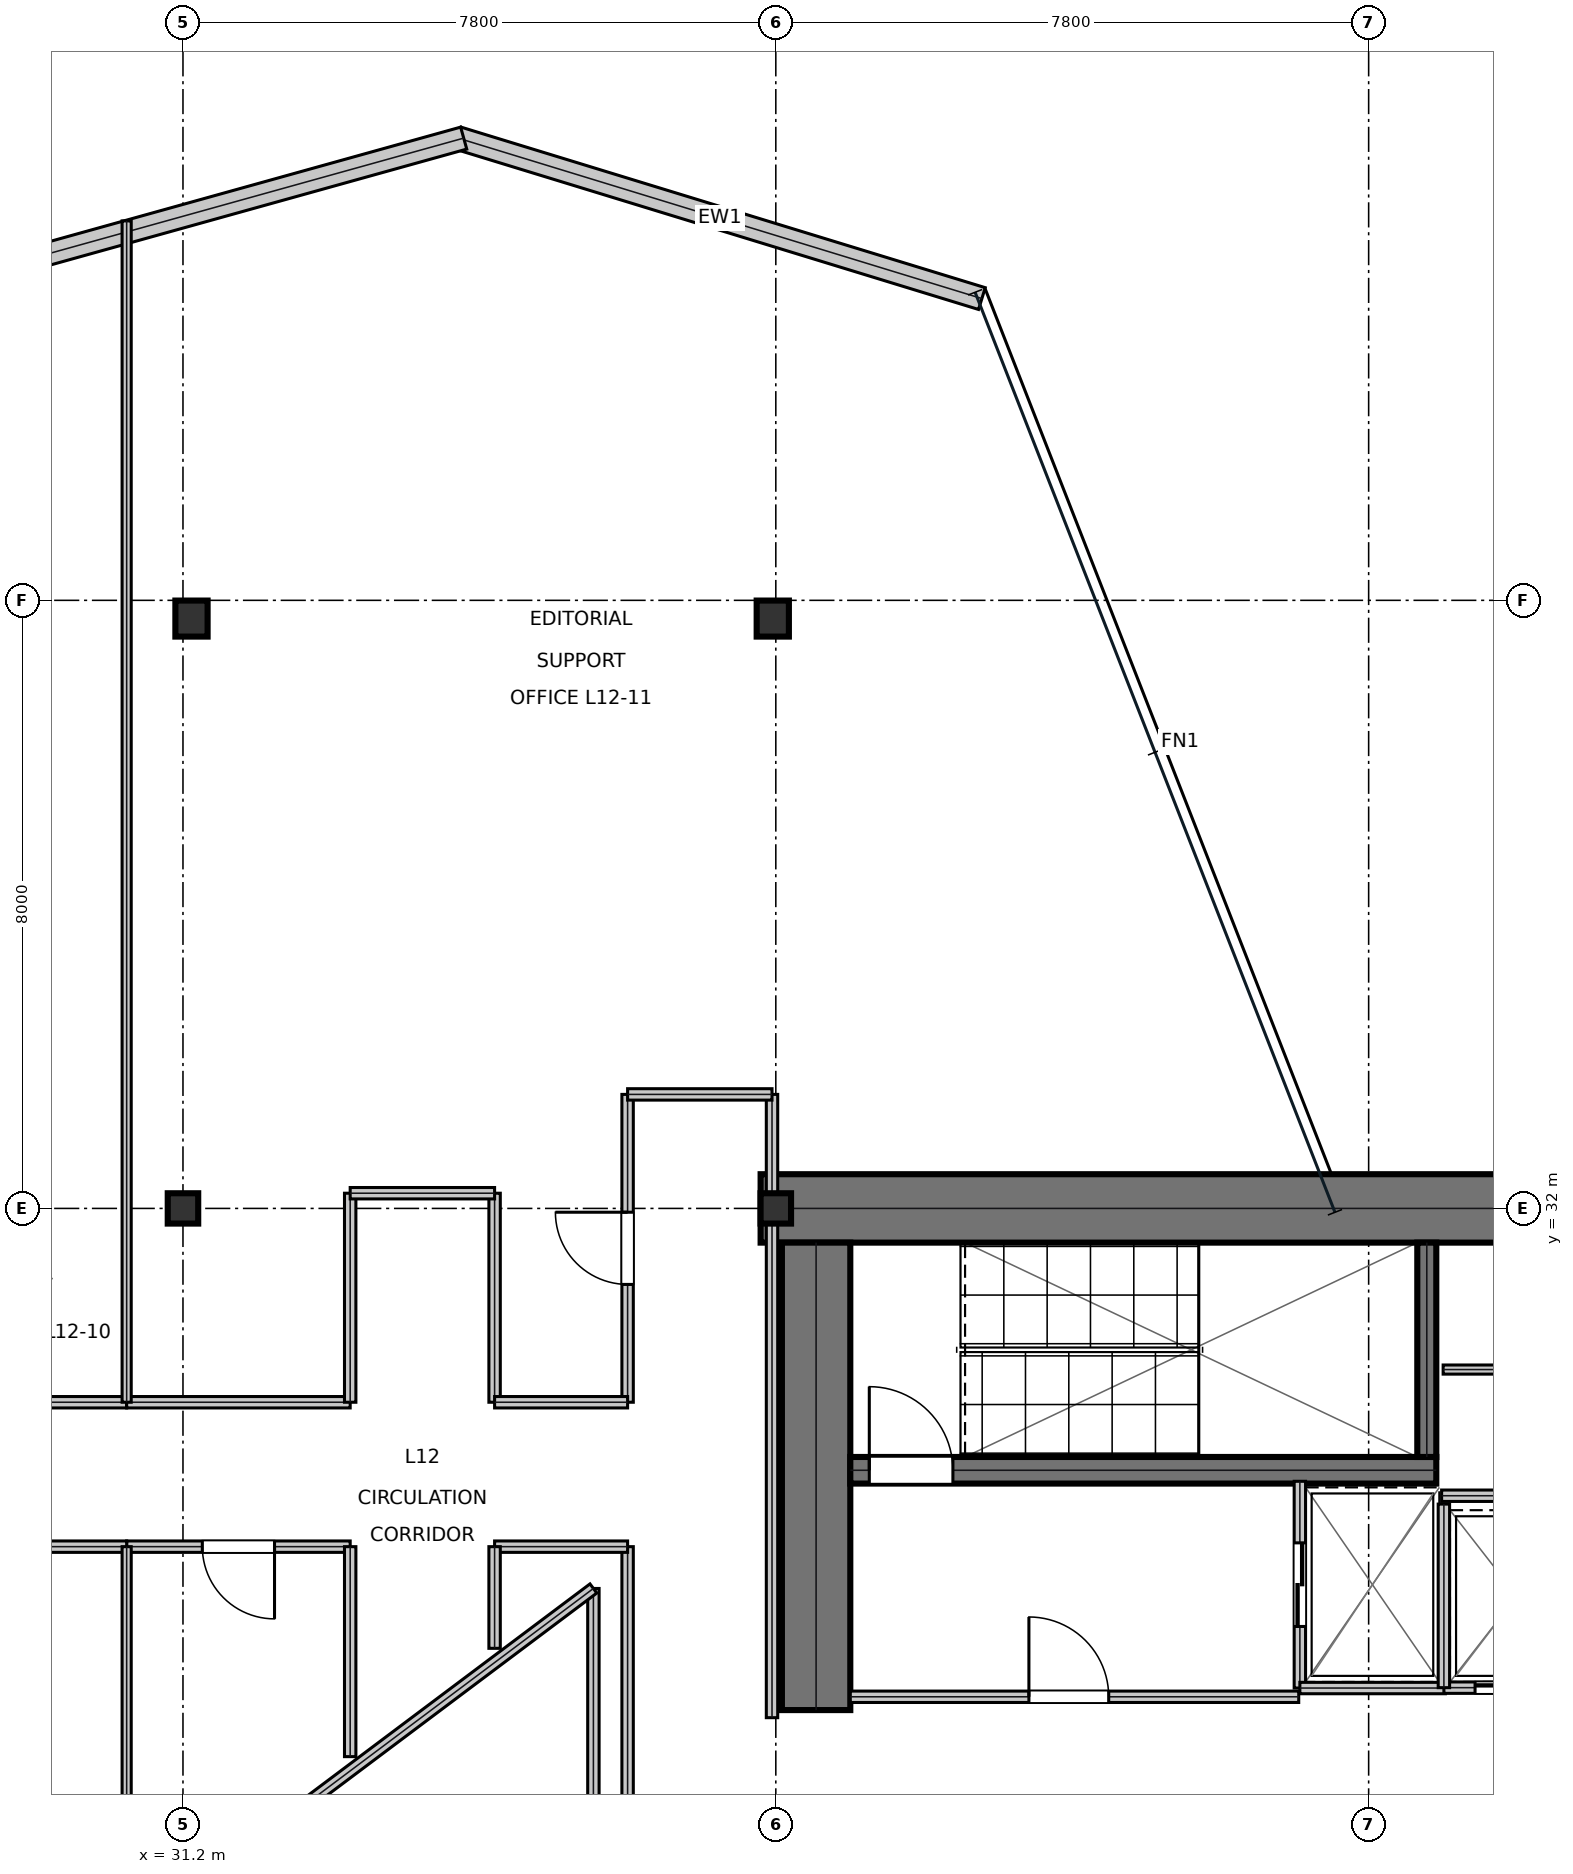
"""IFC4 building model, lengths in metres.
Left out: names, types, materials, properties, quantities, classifications, styles, units other than length and angle.
Written with IfcOpenShell. Run it as: python <this file> out.ifc"""

import sys

from ifc_helpers import new_model, si_unit, direction, frame, frame_2d, origin, origin_2d, place, context, subcontext, project, spatial, rectangle, i_section, extrude, element, fill, save


model = new_model("IFC4")
c1 = context("Model", 3, precision=1e-05, world=origin(), true_north=direction((0.0, 1.0)))
c2 = subcontext(c1, "Body", "Model", "MODEL_VIEW")
j1 = project(units=[si_unit("LENGTHUNIT", "METRE"), si_unit("PLANEANGLEUNIT", "RADIAN")], contexts=[c1])
p1 = place(None, origin())
s1 = spatial("IfcSite", under=j1, at=p1, CompositionType="ELEMENT")
p2 = place(p1, origin())
s2 = spatial("IfcBuilding", under=s1, at=p2, CompositionType="ELEMENT")
p3 = place(p2, frame((0.0, 0.0, 58.05)))
s3 = spatial("IfcBuildingStorey", under=s2, at=p3, CompositionType="ELEMENT", Elevation=58.05)
p4 = place(p3, frame((38.8, 32.0, 0.0), z_axis=(0.0, 0.0, 1.0), x_axis=(1.0, 0.0, 0.0)))
e1 = element("IfcWall", 1, at=p4, inside=s3, PredefinedType="SHEAR", context=c2, shape_type="SweptSolid", body=[
    extrude(rectangle(XDim=16.0, YDim=0.9, at=frame_2d((8.0, 0.0))), origin(), (0.0, 0.0, 1.0), 3.81),
])
p5 = place(p3, frame((39.53, 25.4, 0.0), z_axis=(0.0, 0.0, 1.0), x_axis=(0.0, 1.0, 0.0)))
e2 = element("IfcWall", 2, at=p5, inside=s3, PredefinedType="SHEAR", context=c2, shape_type="SweptSolid", body=[
    extrude(rectangle(XDim=6.15, YDim=0.9, at=frame_2d((3.075, 0.0))), origin(), (0.0, 0.0, 1.0), 3.81),
])
p6 = place(p3, frame((39.98, 28.555, 0.0), z_axis=(0.0, 0.0, 1.0), x_axis=(1.0, 0.0, 0.0)))
e3 = element("IfcWall", 3, at=p6, inside=s3, PredefinedType="SHEAR", context=c2, shape_type="SweptSolid", body=[
    extrude(rectangle(XDim=7.71, YDim=0.35, at=frame_2d((3.855, 0.0))), origin(), (0.0, 0.0, 1.0), 3.81),
])
p7 = place(p6, frame((0.25, 0.0, 0.0)))
e4 = element("IfcOpeningElement", 4, at=p7, cuts=e3, PredefinedType="OPENING", context=c2, shape_type="SweptSolid", body=[
    extrude(rectangle(XDim=1.1, YDim=2.15, at=frame_2d((0.55, 1.075))), frame((0.0, 0.185, 0.0), z_axis=(0.0, -1.0, 0.0), x_axis=(1.0, 0.0, 0.0)), (0.0, 0.0, 1.0), 0.37),
])
p8 = place(p3, frame((47.565, 28.73, 0.0), z_axis=(0.0, 0.0, 1.0), x_axis=(0.0, 1.0, 0.0)))
e5 = element("IfcWall", 5, at=p8, inside=s3, PredefinedType="SHEAR", context=c2, shape_type="SweptSolid", body=[
    extrude(rectangle(XDim=2.82, YDim=0.25, at=frame_2d((1.41, 0.0))), origin(), (0.0, 0.0, 1.0), 3.81),
])
for number, where, z_axis, x_axis in (
    (6, (31.2, 32.0, 0.0), (0.0, 0.0, 1.0), (1.0, 0.0, 0.0)),
    (7, (39.0, 32.0, 0.0), (0.0, 0.0, 1.0), (1.0, 0.0, 0.0)),
):
    element("IfcColumn", number, at=place(p3, frame(where, z_axis=z_axis, x_axis=x_axis)), inside=s3, PredefinedType="COLUMN", context=c2, shape_type="SweptSolid", body=[
        extrude(i_section(OverallWidth=0.401, OverallDepth=0.399, WebThickness=0.025, FlangeThickness=0.04, at=origin_2d()), origin(), (0.0, 0.0, 1.0), 4.044),
    ])
p9 = place(p3, frame((31.312, 39.76, 0.016), z_axis=(0.017423559696, -0.03727549008, 0.999153120101), x_axis=(0.905919107853, 0.423450788199, 0.0)))
e8 = element("IfcColumn", 8, at=p9, inside=s3, PredefinedType="COLUMN", context=c2, shape_type="SweptSolid", body=[
    extrude(i_section(OverallWidth=0.424, OverallDepth=0.474, WebThickness=0.048, FlangeThickness=0.077, at=origin_2d()), origin(), (0.0, 0.0, 1.0), 4.021),
])
p10 = place(p3, frame((38.96, 39.76, 0.016), z_axis=(-0.006193166635, -0.037280434452, 0.9992856518), x_axis=(0.986480631929, -0.163877889995, 0.0)))
e9 = element("IfcColumn", 9, at=p10, inside=s3, PredefinedType="COLUMN", context=c2, shape_type="SweptSolid", body=[
    extrude(i_section(OverallWidth=0.424, OverallDepth=0.474, WebThickness=0.048, FlangeThickness=0.077, at=origin_2d()), origin(), (0.0, 0.0, 1.0), 4.021),
])
p11 = place(p3, frame((41.711, 43.97, 0.0), z_axis=(0.0, 0.0, 1.0), x_axis=(-0.956174816369, 0.292796380685, 0.0)))
e10 = element("IfcWall", 10, at=p11, inside=s3, PredefinedType="STANDARD", context=c2, shape_type="SweptSolid", body=[
    extrude(rectangle(XDim=7.213, YDim=0.3, at=frame_2d((3.606, 0.0))), origin(), (0.0, 0.0, 1.0), 3.81),
])
p12 = place(p3, frame((34.894, 46.081, 0.0), z_axis=(0.0, 0.0, 1.0), x_axis=(-0.963365312104, -0.268192608836, 0.0)))
e11 = element("IfcWall", 11, at=p12, inside=s3, PredefinedType="STANDARD", context=c2, shape_type="SweptSolid", body=[
    extrude(rectangle(XDim=7.159, YDim=0.3, at=frame_2d((3.579, 0.0))), origin(), (0.0, 0.0, 1.0), 3.81),
])
p13 = place(p3, frame((39.98, 25.575, 0.0), z_axis=(0.0, 0.0, 1.0), x_axis=(1.0, 0.0, 0.0)))
e12 = element("IfcWall", 12, at=p13, inside=s3, PredefinedType="PARTITIONING", context=c2, shape_type="SweptSolid", body=[
    extrude(rectangle(XDim=5.9, YDim=0.15, at=frame_2d((2.95, 0.0))), origin(), (0.0, 0.0, 1.0), 3.81),
])
p14 = place(p13, frame((2.35, 0.0, 0.0)))
e13 = element("IfcOpeningElement", 13, at=p14, cuts=e12, PredefinedType="OPENING", context=c2, shape_type="SweptSolid", body=[
    extrude(rectangle(XDim=1.05, YDim=2.15, at=frame_2d((0.525, 1.075))), frame((0.0, 0.085, 0.0), z_axis=(0.0, -1.0, 0.0), x_axis=(1.0, 0.0, 0.0)), (0.0, 0.0, 1.0), 0.17),
])
p15 = place(p3, frame((45.895, 25.69, 0.0), z_axis=(0.0, 0.0, 1.0), x_axis=(0.0, 1.0, 0.0)))
e14 = element("IfcWall", 14, at=p15, inside=s3, PredefinedType="PARTITIONING", context=c2, shape_type="SweptSolid", body=[
    extrude(rectangle(XDim=2.72, YDim=0.15, at=frame_2d((1.36, 0.0))), origin(), (0.0, 0.0, 1.0), 3.81),
])
p16 = place(p15, frame((0.81, 0.0, 0.0)))
e15 = element("IfcOpeningElement", 15, at=p16, cuts=e14, PredefinedType="OPENING", context=c2, shape_type="SweptSolid", body=[
    extrude(rectangle(XDim=1.1, YDim=2.15, at=frame_2d((0.55, 1.075))), frame((0.0, 0.085, 0.0), z_axis=(0.0, -1.0, 0.0), x_axis=(1.0, 0.0, 0.0)), (0.0, 0.0, 1.0), 0.17),
])
p17 = place(p3, frame((45.895, 25.69, 0.0), z_axis=(0.0, 0.0, 1.0), x_axis=(1.0, 0.0, 0.0)))
e16 = element("IfcWall", 16, at=p17, inside=s3, PredefinedType="PARTITIONING", context=c2, shape_type="SweptSolid", body=[
    extrude(rectangle(XDim=1.915, YDim=0.15, at=frame_2d((0.958, 0.0))), origin(), (0.0, 0.0, 1.0), 3.81),
])
p18 = place(p3, frame((47.79, 25.695, 0.0), z_axis=(0.0, 0.0, 1.0), x_axis=(1.0, 0.0, 0.0)))
e17 = element("IfcWall", 17, at=p18, inside=s3, PredefinedType="PARTITIONING", context=c2, shape_type="SweptSolid", body=[
    extrude(rectangle(XDim=1.92, YDim=0.15, at=frame_2d((0.96, 0.0))), origin(), (0.0, 0.0, 1.0), 3.81),
])
p19 = place(p18, frame((0.41, 0.0, 0.0)))
e18 = element("IfcOpeningElement", 18, at=p19, cuts=e17, PredefinedType="OPENING", context=c2, shape_type="SweptSolid", body=[
    extrude(rectangle(XDim=1.1, YDim=2.15, at=frame_2d((0.55, 1.075))), frame((0.0, 0.085, 0.0), z_axis=(0.0, -1.0, 0.0), x_axis=(1.0, 0.0, 0.0)), (0.0, 0.0, 1.0), 0.17),
])
p20 = place(p3, frame((47.79, 25.695, 0.0), z_axis=(0.0, 0.0, 1.0), x_axis=(0.0, 1.0, 0.0)))
e19 = element("IfcWall", 19, at=p20, inside=s3, PredefinedType="PARTITIONING", context=c2, shape_type="SweptSolid", body=[
    extrude(rectangle(XDim=2.415, YDim=0.15, at=frame_2d((1.208, 0.0))), origin(), (0.0, 0.0, 1.0), 3.81),
])
p21 = place(p3, frame((47.76, 28.22, 0.0), z_axis=(0.0, 0.0, 1.0), x_axis=(1.0, 0.0, 0.0)))
e20 = element("IfcWall", 20, at=p21, inside=s3, PredefinedType="PARTITIONING", context=c2, shape_type="SweptSolid", body=[
    extrude(rectangle(XDim=1.96, YDim=0.15, at=frame_2d((0.98, 0.0))), origin(), (0.0, 0.0, 1.0), 3.81),
])
p22 = place(p3, frame((47.78, 29.88, 0.0), z_axis=(0.0, 0.0, 1.0), x_axis=(1.0, 0.0, 0.0)))
e21 = element("IfcWall", 21, at=p22, inside=s3, PredefinedType="PARTITIONING", context=c2, shape_type="SweptSolid", body=[
    extrude(rectangle(XDim=1.92, YDim=0.12, at=frame_2d((0.96, 0.0))), origin(), (0.0, 0.0, 1.0), 3.81),
])
p23 = place(p3, frame((37.05, 14.5, 0.0), z_axis=(0.0, 0.0, 1.0), x_axis=(0.0, 1.0, 0.0)))
e22 = element("IfcWall", 22, at=p23, inside=s3, PredefinedType="PARTITIONING", context=c2, shape_type="SweptSolid", body=[
    extrude(rectangle(XDim=13.05, YDim=0.15, at=frame_2d((6.525, 0.0))), origin(), (0.0, 0.0, 1.0), 3.181),
])
p24 = place(p23, frame((4.61, 0.0, 0.0)))
e23 = element("IfcOpeningElement", 23, at=p24, cuts=e22, PredefinedType="OPENING", context=c2, shape_type="SweptSolid", body=[
    extrude(rectangle(XDim=0.95, YDim=2.15, at=frame_2d((0.475, 1.075))), frame((0.0, 0.085, 0.0), z_axis=(0.0, -1.0, 0.0), x_axis=(1.0, 0.0, 0.0)), (0.0, 0.0, 1.0), 0.17),
])
p25 = place(p3, frame((30.459, 27.55, 0.0), z_axis=(0.0, 0.0, 1.0), x_axis=(1.0, 0.0, 0.0)))
e24 = element("IfcWall", 24, at=p25, inside=s3, PredefinedType="PARTITIONING", context=c2, shape_type="SweptSolid", body=[
    extrude(rectangle(XDim=2.941, YDim=0.15, at=frame_2d((1.47, 0.0))), origin(), (0.0, 0.0, 1.0), 3.181),
])
p26 = place(p25, frame((0.996, 0.0, 0.0)))
e25 = element("IfcOpeningElement", 25, at=p26, cuts=e24, PredefinedType="OPENING", context=c2, shape_type="SweptSolid", body=[
    extrude(rectangle(XDim=0.95, YDim=2.15, at=frame_2d((0.475, 1.075))), frame((0.0, 0.085, 0.0), z_axis=(0.0, -1.0, 0.0), x_axis=(1.0, 0.0, 0.0)), (0.0, 0.0, 1.0), 0.17),
])
p27 = place(p3, frame((21.4, 27.55, 0.0), z_axis=(0.0, 0.0, 1.0), x_axis=(1.0, 0.0, 0.0)))
e26 = element("IfcWall", 26, at=p27, inside=s3, PredefinedType="PARTITIONING", context=c2, shape_type="SweptSolid", body=[
    extrude(rectangle(XDim=9.059, YDim=0.15, at=frame_2d((4.53, 0.0))), origin(), (0.0, 0.0, 1.0), 3.391),
])
p28 = place(p27, frame((4.054, 0.0, 0.0)))
e27 = element("IfcOpeningElement", 27, at=p28, cuts=e26, PredefinedType="OPENING", context=c2, shape_type="SweptSolid", body=[
    extrude(rectangle(XDim=0.95, YDim=2.15, at=frame_2d((0.475, 1.075))), frame((0.0, 0.085, 0.0), z_axis=(0.0, -1.0, 0.0), x_axis=(1.0, 0.0, 0.0)), (0.0, 0.0, 1.0), 0.17),
])
p29 = place(p3, frame((15.794, 29.45, 0.0), z_axis=(0.0, 0.0, 1.0), x_axis=(1.0, 0.0, 0.0)))
e28 = element("IfcWall", 28, at=p29, inside=s3, PredefinedType="PARTITIONING", context=c2, shape_type="SweptSolid", body=[
    extrude(rectangle(XDim=14.665, YDim=0.15, at=frame_2d((7.333, 0.0))), origin(), (0.0, 0.0, 1.0), 3.338),
])
p30 = place(p29, frame((10.458, 0.0, 0.0)))
e29 = element("IfcOpeningElement", 29, at=p30, cuts=e28, PredefinedType="OPENING", context=c2, shape_type="SweptSolid", body=[
    extrude(rectangle(XDim=0.95, YDim=2.15, at=frame_2d((0.475, 1.075))), frame((0.0, 0.085, 0.0), z_axis=(0.0, -1.0, 0.0), x_axis=(1.0, 0.0, 0.0)), (0.0, 0.0, 1.0), 0.17),
])
p31 = place(p3, frame((37.05, 29.45, 0.0), z_axis=(0.0, 0.0, 1.0), x_axis=(0.0, 1.0, 0.0)))
e30 = element("IfcWall", 30, at=p31, inside=s3, PredefinedType="PARTITIONING", context=c2, shape_type="SweptSolid", body=[
    extrude(rectangle(XDim=4.05, YDim=0.15, at=frame_2d((2.025, 0.0))), origin(), (0.0, 0.0, 1.0), 3.181),
])
p32 = place(p31, frame((1.55, 0.0, 0.0)))
e31 = element("IfcOpeningElement", 31, at=p32, cuts=e30, PredefinedType="OPENING", context=c2, shape_type="SweptSolid", body=[
    extrude(rectangle(XDim=0.95, YDim=2.15, at=frame_2d((0.475, 1.075))), frame((0.0, 0.085, 0.0), z_axis=(0.0, -1.0, 0.0), x_axis=(1.0, 0.0, 0.0)), (0.0, 0.0, 1.0), 0.17),
])
p33 = place(p3, frame((35.3, 27.55, 0.0), z_axis=(0.0, 0.0, 1.0), x_axis=(1.0, 0.0, 0.0)))
e32 = element("IfcWall", 32, at=p33, inside=s3, PredefinedType="PARTITIONING", context=c2, shape_type="SweptSolid", body=[
    extrude(rectangle(XDim=1.75, YDim=0.15, at=frame_2d((0.875, 0.0))), origin(), (0.0, 0.0, 1.0), 3.391),
])
p34 = place(p3, frame((35.3, 26.212, 0.0), z_axis=(0.0, 0.0, 1.0), x_axis=(0.0, 1.0, 0.0)))
e33 = element("IfcWall", 33, at=p34, inside=s3, PredefinedType="PARTITIONING", context=c2, shape_type="SweptSolid", body=[
    extrude(rectangle(XDim=1.338, YDim=0.15, at=frame_2d((0.669, 0.0))), origin(), (0.0, 0.0, 1.0), 3.81),
])
p35 = place(p3, frame((33.4, 24.788, 0.0), z_axis=(0.0, 0.0, 1.0), x_axis=(0.0, 1.0, 0.0)))
e34 = element("IfcWall", 34, at=p35, inside=s3, PredefinedType="PARTITIONING", context=c2, shape_type="SweptSolid", body=[
    extrude(rectangle(XDim=2.762, YDim=0.15, at=frame_2d((1.381, 0.0))), origin(), (0.0, 0.0, 1.0), 3.81),
])
p36 = place(p3, frame((38.95, 25.3, 0.0), z_axis=(0.0, 0.0, 1.0), x_axis=(0.0, 1.0, 0.0)))
e35 = element("IfcWall", 35, at=p36, inside=s3, PredefinedType="PARTITIONING", context=c2, shape_type="SweptSolid", body=[
    extrude(rectangle(XDim=8.2, YDim=0.15, at=frame_2d((4.1, 0.0))), origin(), (0.0, 0.0, 1.0), 3.181),
])
p37 = place(p3, frame((30.459, 29.45, 0.0), z_axis=(0.0, 0.0, 1.0), x_axis=(1.0, 0.0, 0.0)))
e36 = element("IfcWall", 36, at=p37, inside=s3, PredefinedType="PARTITIONING", context=c2, shape_type="SweptSolid", body=[
    extrude(rectangle(XDim=2.941, YDim=0.15, at=frame_2d((1.47, 0.0))), origin(), (0.0, 0.0, 1.0), 3.181),
])
for number, where, z_axis, x_axis in (
    (37, (33.4, 29.45, 0.0), (0.0, 0.0, 1.0), (0.0, 1.0, 0.0)),
    (38, (35.3, 29.45, 0.0), (0.0, 0.0, 1.0), (0.0, 1.0, 0.0)),
):
    element("IfcWall", number, at=place(p3, frame(where, z_axis=z_axis, x_axis=x_axis)), inside=s3, PredefinedType="PARTITIONING", context=c2, shape_type="SweptSolid", body=[
        extrude(rectangle(XDim=2.75, YDim=0.15, at=frame_2d((1.375, 0.0))), origin(), (0.0, 0.0, 1.0), 3.181),
    ])
p38 = place(p3, frame((37.05, 33.5, 0.0), z_axis=(0.0, 0.0, 1.0), x_axis=(1.0, 0.0, 0.0)))
e39 = element("IfcWall", 39, at=p38, inside=s3, PredefinedType="PARTITIONING", context=c2, shape_type="SweptSolid", body=[
    extrude(rectangle(XDim=1.9, YDim=0.15, at=frame_2d((0.95, 0.0))), origin(), (0.0, 0.0, 1.0), 3.81),
])
p39 = place(p3, frame((33.4, 32.2, 0.0), z_axis=(0.0, 0.0, 1.0), x_axis=(1.0, 0.0, 0.0)))
e40 = element("IfcWall", 40, at=p39, inside=s3, PredefinedType="PARTITIONING", context=c2, shape_type="SweptSolid", body=[
    extrude(rectangle(XDim=1.9, YDim=0.15, at=frame_2d((0.95, 0.0))), origin(), (0.0, 0.0, 1.0), 3.181),
])
p40 = place(p3, frame((35.3, 29.45, 0.0), z_axis=(0.0, 0.0, 1.0), x_axis=(1.0, 0.0, 0.0)))
e41 = element("IfcWall", 41, at=p40, inside=s3, PredefinedType="PARTITIONING", context=c2, shape_type="SweptSolid", body=[
    extrude(rectangle(XDim=1.75, YDim=0.15, at=frame_2d((0.875, 0.0))), origin(), (0.0, 0.0, 1.0), 3.81),
])
p41 = place(p3, frame((30.459, 23.111, 0.0), z_axis=(0.0, 0.0, 1.0), x_axis=(0.0, 1.0, 0.0)))
e42 = element("IfcWall", 42, at=p41, inside=s3, PredefinedType="PARTITIONING", context=c2, shape_type="SweptSolid", body=[
    extrude(rectangle(XDim=4.439, YDim=0.12, at=frame_2d((2.219, 0.0))), origin(), (0.0, 0.0, 1.0), 3.181),
])
p42 = place(p3, frame((30.459, 29.45, 0.0), z_axis=(0.0, 0.0, 1.0), x_axis=(0.0, 1.0, 0.0)))
e43 = element("IfcWall", 43, at=p42, inside=s3, PredefinedType="PARTITIONING", context=c2, shape_type="SweptSolid", body=[
    extrude(rectangle(XDim=15.542, YDim=0.12, at=frame_2d((7.771, 0.0))), origin(), (0.0, 0.0, 1.0), 3.338),
])
p43 = place(p3, frame((36.6, 21.0, 0.0), z_axis=(0.0, 0.0, 1.0), x_axis=(0.0, 1.0, 0.0)))
e44 = element("IfcWall", 44, at=p43, inside=s3, PredefinedType="MOVABLE", context=c2, shape_type="SweptSolid", body=[
    extrude(rectangle(XDim=6.0, YDim=0.15, at=frame_2d((3.0, 0.0))), origin(), (0.0, 0.0, 1.0), 3.81),
])
p44 = place(p3, frame((36.6, 27.0, 0.0), z_axis=(0.0, 0.0, 1.0), x_axis=(-0.8, -0.6, 0.0)))
e45 = element("IfcWall", 45, at=p44, inside=s3, PredefinedType="MOVABLE", context=c2, shape_type="SweptSolid", body=[
    extrude(rectangle(XDim=5.0, YDim=0.15, at=frame_2d((2.5, 0.0))), origin(), (0.0, 0.0, 1.0), 3.81),
])
p45 = place(p14, origin())
e46 = element("IfcDoor", 46, at=p45, inside=s3, OperationType="SINGLE_SWING_LEFT", PredefinedType="DOOR", context=c2, shape_type="SweptSolid", body=[
    extrude(rectangle(XDim=1.05, YDim=2.15, at=frame_2d((0.525, 1.075))), frame((0.0, 0.025, 0.0), z_axis=(0.0, -1.0, 0.0), x_axis=(1.0, 0.0, 0.0)), (0.0, 0.0, 1.0), 0.05),
])
fill(e13, e46)
p46 = place(p16, frame((1.1, 0.0, 0.0), z_axis=(0.0, 0.0, 1.0), x_axis=(-1.0, 0.0, 0.0)))
e47 = element("IfcDoor", 47, at=p46, inside=s3, OperationType="DOUBLE_DOOR_SLIDING", PredefinedType="DOOR", context=c2, shape_type="SweptSolid", body=[
    extrude(rectangle(XDim=1.1, YDim=2.15, at=frame_2d((0.55, 1.075))), frame((0.0, 0.025, 0.0), z_axis=(0.0, -1.0, 0.0), x_axis=(1.0, 0.0, 0.0)), (0.0, 0.0, 1.0), 0.05),
])
fill(e15, e47)
p47 = place(p19, frame((1.1, 0.0, 0.0), z_axis=(0.0, 0.0, 1.0), x_axis=(-1.0, 0.0, 0.0)))
e48 = element("IfcDoor", 48, at=p47, inside=s3, OperationType="DOUBLE_DOOR_SLIDING", PredefinedType="DOOR", context=c2, shape_type="SweptSolid", body=[
    extrude(rectangle(XDim=1.1, YDim=2.15, at=frame_2d((0.55, 1.075))), frame((0.0, 0.025, 0.0), z_axis=(0.0, -1.0, 0.0), x_axis=(1.0, 0.0, 0.0)), (0.0, 0.0, 1.0), 0.05),
])
fill(e18, e48)
p48 = place(p26, frame((0.95, 0.0, 0.0), z_axis=(0.0, 0.0, 1.0), x_axis=(-1.0, 0.0, 0.0)))
e49 = element("IfcDoor", 49, at=p48, inside=s3, OperationType="SINGLE_SWING_LEFT", PredefinedType="DOOR", context=c2, shape_type="SweptSolid", body=[
    extrude(rectangle(XDim=0.95, YDim=2.15, at=frame_2d((0.475, 1.075))), frame((0.0, 0.025, 0.0), z_axis=(0.0, -1.0, 0.0), x_axis=(1.0, 0.0, 0.0)), (0.0, 0.0, 1.0), 0.05),
])
fill(e25, e49)
p49 = place(p32, origin())
e50 = element("IfcDoor", 50, at=p49, inside=s3, OperationType="SINGLE_SWING_RIGHT", PredefinedType="DOOR", context=c2, shape_type="SweptSolid", body=[
    extrude(rectangle(XDim=0.95, YDim=2.15, at=frame_2d((0.475, 1.075))), frame((0.0, 0.025, 0.0), z_axis=(0.0, -1.0, 0.0), x_axis=(1.0, 0.0, 0.0)), (0.0, 0.0, 1.0), 0.05),
])
fill(e31, e50)
p50 = place(p7, origin())
e51 = element("IfcDoor", 51, at=p50, inside=s3, OperationType="SINGLE_SWING_LEFT", PredefinedType="DOOR", context=c2, shape_type="SweptSolid", body=[
    extrude(rectangle(XDim=1.1, YDim=2.15, at=frame_2d((0.55, 1.075))), frame((0.0, 0.025, 0.0), z_axis=(0.0, -1.0, 0.0), x_axis=(1.0, 0.0, 0.0)), (0.0, 0.0, 1.0), 0.05),
])
fill(e4, e51)
save(model, sys.argv[1])
